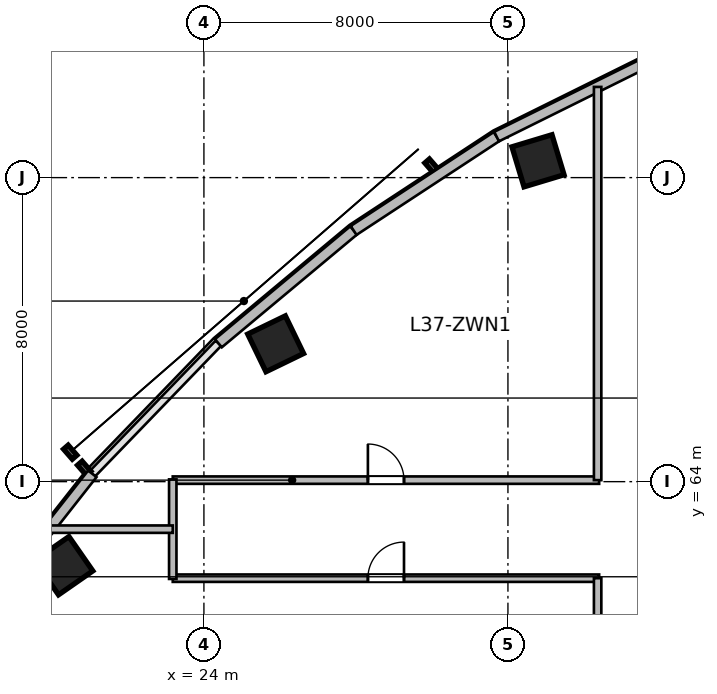
"""IFC4 building model, lengths in metres.
Left out: names, types, materials, properties, quantities, classifications, styles, units other than length and angle.
Written with IfcOpenShell. Run it as: python <this file> out.ifc"""

import sys

from ifc_helpers import new_model, si_unit, direction, frame, frame_2d, origin, origin_2d, place, context, subcontext, project, spatial, rectangle, extrude, source, transform, mapped, element, fill, save


model = new_model("IFC4")
c1 = context("Model", 3, precision=1e-05, world=origin(), true_north=direction((0.0, 1.0)))
c2 = subcontext(c1, "Body", "Model", "MODEL_VIEW")
j1 = project(units=[si_unit("LENGTHUNIT", "METRE"), si_unit("PLANEANGLEUNIT", "RADIAN")], contexts=[c1])
p1 = place(None, origin())
s1 = spatial("IfcSite", under=j1, at=p1, CompositionType="ELEMENT")
p2 = place(p1, origin())
s2 = spatial("IfcBuilding", under=s1, at=p2, CompositionType="ELEMENT")
p3 = place(p2, frame((0.0, 0.0, 154.5)))
s3 = spatial("IfcBuildingStorey", under=s2, at=p3, CompositionType="ELEMENT", Elevation=154.5)
m1 = source(origin(), c2, "Body", "SweptSolid", [
    extrude(rectangle(XDim=1.1, YDim=1.1, at=origin_2d()), origin(), (0.0, 0.0, 1.0), 3.9),
])
for number, where, z_axis, x_axis in (
    (1, (20.311, 61.789, 0.0), (0.0, 0.0, 1.0), (-0.571, 0.821, 0.0)),
    (2, (25.888, 67.627, 0.0), (0.0, 0.0, 1.0), (-0.436, 0.9, 0.0)),
    (3, (32.791, 72.442, 0.0), (0.0, 0.0, 1.0), (-0.289, 0.957, 0.0)),
):
    element("IfcColumn", number, at=place(p3, frame(where, z_axis=z_axis, x_axis=x_axis)), inside=s3, PredefinedType="COLUMN", context=c2, shape_type="MappedRepresentation", body=[
        mapped(m1, transform((0.0, 0.0, 0.0), scale=1.0)),
    ])
m2 = source(origin(), c2, "Body", "SweptSolid", [
    extrude(rectangle(XDim=4.922, YDim=0.28, at=frame_2d((2.461, 0.0))), origin(), (0.0, 0.0, 1.0), 3.65),
])
p4 = place(p3, frame((18.021, 60.338, 0.0), z_axis=(0.0, 0.0, 1.0), x_axis=(0.61817639101, 0.786039407153, 0.0)))
e4 = element("IfcWall", 4, at=p4, inside=s3, PredefinedType="SOLIDWALL", context=c2, shape_type="MappedRepresentation", body=[
    mapped(m2, transform((0.0, 0.0, 0.0), scale=1.0)),
])
m3 = source(origin(), c2, "Body", "SweptSolid", [
    extrude(rectangle(XDim=4.634, YDim=0.28, at=frame_2d((2.317, 0.0))), origin(), (0.0, 0.0, 1.0), 3.65),
])
p5 = place(p3, frame((24.381, 67.642, 0.0), z_axis=(0.0, 0.0, 1.0), x_axis=(0.767910229096, 0.640557475993, 0.0)))
e5 = element("IfcWall", 5, at=p5, inside=s3, PredefinedType="SOLIDWALL", context=c2, shape_type="MappedRepresentation", body=[
    mapped(m3, transform((0.0, 0.0, 0.0), scale=1.0)),
])
m4 = source(origin(), c2, "Body", "SweptSolid", [
    extrude(rectangle(XDim=4.501, YDim=0.28, at=frame_2d((2.25, 0.0))), origin(), (0.0, 0.0, 1.0), 3.65),
])
p6 = place(p3, frame((27.939, 70.61, 0.0), z_axis=(0.0, 0.0, 1.0), x_axis=(0.835984920737, 0.548752414391, 0.0)))
e6 = element("IfcWall", 6, at=p6, inside=s3, PredefinedType="SOLIDWALL", context=c2, shape_type="MappedRepresentation", body=[
    mapped(m4, transform((0.0, 0.0, 0.0), scale=1.0)),
])
m5 = source(origin(), c2, "Body", "SweptSolid", [
    extrude(rectangle(XDim=4.384, YDim=0.28, at=frame_2d((2.192, 0.0))), origin(), (0.0, 0.0, 1.0), 3.65),
])
p7 = place(p3, frame((31.702, 73.08, 0.0), z_axis=(0.0, 0.0, 1.0), x_axis=(0.895969968053, 0.444114643248, 0.0)))
e7 = element("IfcWall", 7, at=p7, inside=s3, PredefinedType="SOLIDWALL", context=c2, shape_type="MappedRepresentation", body=[
    mapped(m5, transform((0.0, 0.0, 0.0), scale=1.0)),
])
m6 = source(origin(), c2, "Body", "SweptSolid", [
    extrude(rectangle(XDim=11.22, YDim=0.195, at=frame_2d((5.61, 0.0))), origin(), (0.0, 0.0, 1.0), 3.65),
])
p8 = place(p3, frame((23.18, 64.04, 0.0), z_axis=(0.0, 0.0, 1.0), x_axis=(1.0, 0.0, 0.0)))
e8 = element("IfcWall", 8, at=p8, inside=s3, PredefinedType="PARTITIONING", context=c2, shape_type="MappedRepresentation", body=[
    mapped(m6, transform((0.0, 0.0, 0.0), scale=1.0)),
])
p9 = place(p8, frame((5.135, 0.0, 0.0)))
e9 = element("IfcOpeningElement", 9, at=p9, cuts=e8, PredefinedType="OPENING", context=c2, shape_type="SweptSolid", body=[
    extrude(rectangle(XDim=0.95, YDim=2.1, at=frame_2d((0.475, 1.05))), frame((0.0, 0.107, 0.0), z_axis=(0.0, -1.0, 0.0), x_axis=(1.0, 0.0, 0.0)), (0.0, 0.0, 1.0), 0.215),
])
p10 = place(p3, frame((23.18, 61.46, 0.0), z_axis=(0.0, 0.0, 1.0), x_axis=(1.0, 0.0, 0.0)))
e10 = element("IfcWall", 10, at=p10, inside=s3, PredefinedType="PARTITIONING", context=c2, shape_type="MappedRepresentation", body=[
    mapped(m6, transform((0.0, 0.0, 0.0), scale=1.0)),
])
p11 = place(p10, frame((5.135, 0.0, 0.0)))
e11 = element("IfcOpeningElement", 11, at=p11, cuts=e10, PredefinedType="OPENING", context=c2, shape_type="SweptSolid", body=[
    extrude(rectangle(XDim=0.95, YDim=2.1, at=frame_2d((0.475, 1.05))), frame((0.0, 0.107, 0.0), z_axis=(0.0, -1.0, 0.0), x_axis=(1.0, 0.0, 0.0)), (0.0, 0.0, 1.0), 0.215),
])
m7 = source(origin(), c2, "Body", "SweptSolid", [
    extrude(rectangle(XDim=12.126, YDim=0.195, at=frame_2d((6.063, 0.0))), origin(), (0.0, 0.0, 1.0), 3.65),
])
p12 = place(p3, frame((34.36, 49.334, 0.0), z_axis=(0.0, 0.0, 1.0), x_axis=(0.0, 1.0, 0.0)))
e12 = element("IfcWall", 12, at=p12, inside=s3, PredefinedType="PARTITIONING", context=c2, shape_type="MappedRepresentation", body=[
    mapped(m7, transform((0.0, 0.0, 0.0), scale=1.0)),
])
m8 = source(origin(), c2, "Body", "SweptSolid", [
    extrude(rectangle(XDim=10.346, YDim=0.195, at=frame_2d((5.173, 0.0))), origin(), (0.0, 0.0, 1.0), 3.65),
])
p13 = place(p3, frame((34.36, 64.04, 0.0), z_axis=(0.0, 0.0, 1.0), x_axis=(0.0, 1.0, 0.0)))
e13 = element("IfcWall", 13, at=p13, inside=s3, PredefinedType="PARTITIONING", context=c2, shape_type="MappedRepresentation", body=[
    mapped(m8, transform((0.0, 0.0, 0.0), scale=1.0)),
])
m9 = source(origin(), c2, "Body", "SweptSolid", [
    extrude(rectangle(XDim=2.62, YDim=0.195, at=frame_2d((1.31, 0.0))), origin(), (0.0, 0.0, 1.0), 3.65),
])
p14 = place(p3, frame((23.18, 61.44, 0.0), z_axis=(0.0, 0.0, 1.0), x_axis=(0.0, 1.0, 0.0)))
e14 = element("IfcWall", 14, at=p14, inside=s3, PredefinedType="PARTITIONING", context=c2, shape_type="MappedRepresentation", body=[
    mapped(m9, transform((0.0, 0.0, 0.0), scale=1.0)),
])
m10 = source(origin(), c2, "Body", "SweptSolid", [
    extrude(rectangle(XDim=3.249, YDim=0.195, at=frame_2d((1.625, 0.0))), origin(), (0.0, 0.0, 1.0), 3.65),
])
p15 = place(p3, frame((19.931, 62.75, 0.0), z_axis=(0.0, 0.0, 1.0), x_axis=(1.0, 0.0, 0.0)))
e15 = element("IfcWall", 15, at=p15, inside=s3, PredefinedType="PARTITIONING", context=c2, shape_type="MappedRepresentation", body=[
    mapped(m10, transform((0.0, 0.0, 0.0), scale=1.0)),
])
m11 = source(origin(), c2, "Body", "SweptSolid", [
    extrude(rectangle(XDim=0.95, YDim=2.1, at=frame_2d((0.475, 1.05))), frame((0.0, 0.025, 0.0), z_axis=(0.0, -1.0, 0.0), x_axis=(1.0, 0.0, 0.0)), (0.0, 0.0, 1.0), 0.05),
])
p16 = place(p9, origin())
e16 = element("IfcDoor", 16, at=p16, inside=s3, OperationType="SINGLE_SWING_LEFT", PredefinedType="DOOR", context=c2, shape_type="MappedRepresentation", body=[
    mapped(m11, transform((0.0, 0.0, 0.0), scale=1.0)),
])
fill(e9, e16)
p17 = place(p11, origin())
e17 = element("IfcDoor", 17, at=p17, inside=s3, OperationType="SINGLE_SWING_RIGHT", PredefinedType="DOOR", context=c2, shape_type="MappedRepresentation", body=[
    mapped(m11, transform((0.0, 0.0, 0.0), scale=1.0)),
])
fill(e11, e17)
save(model, sys.argv[1])
